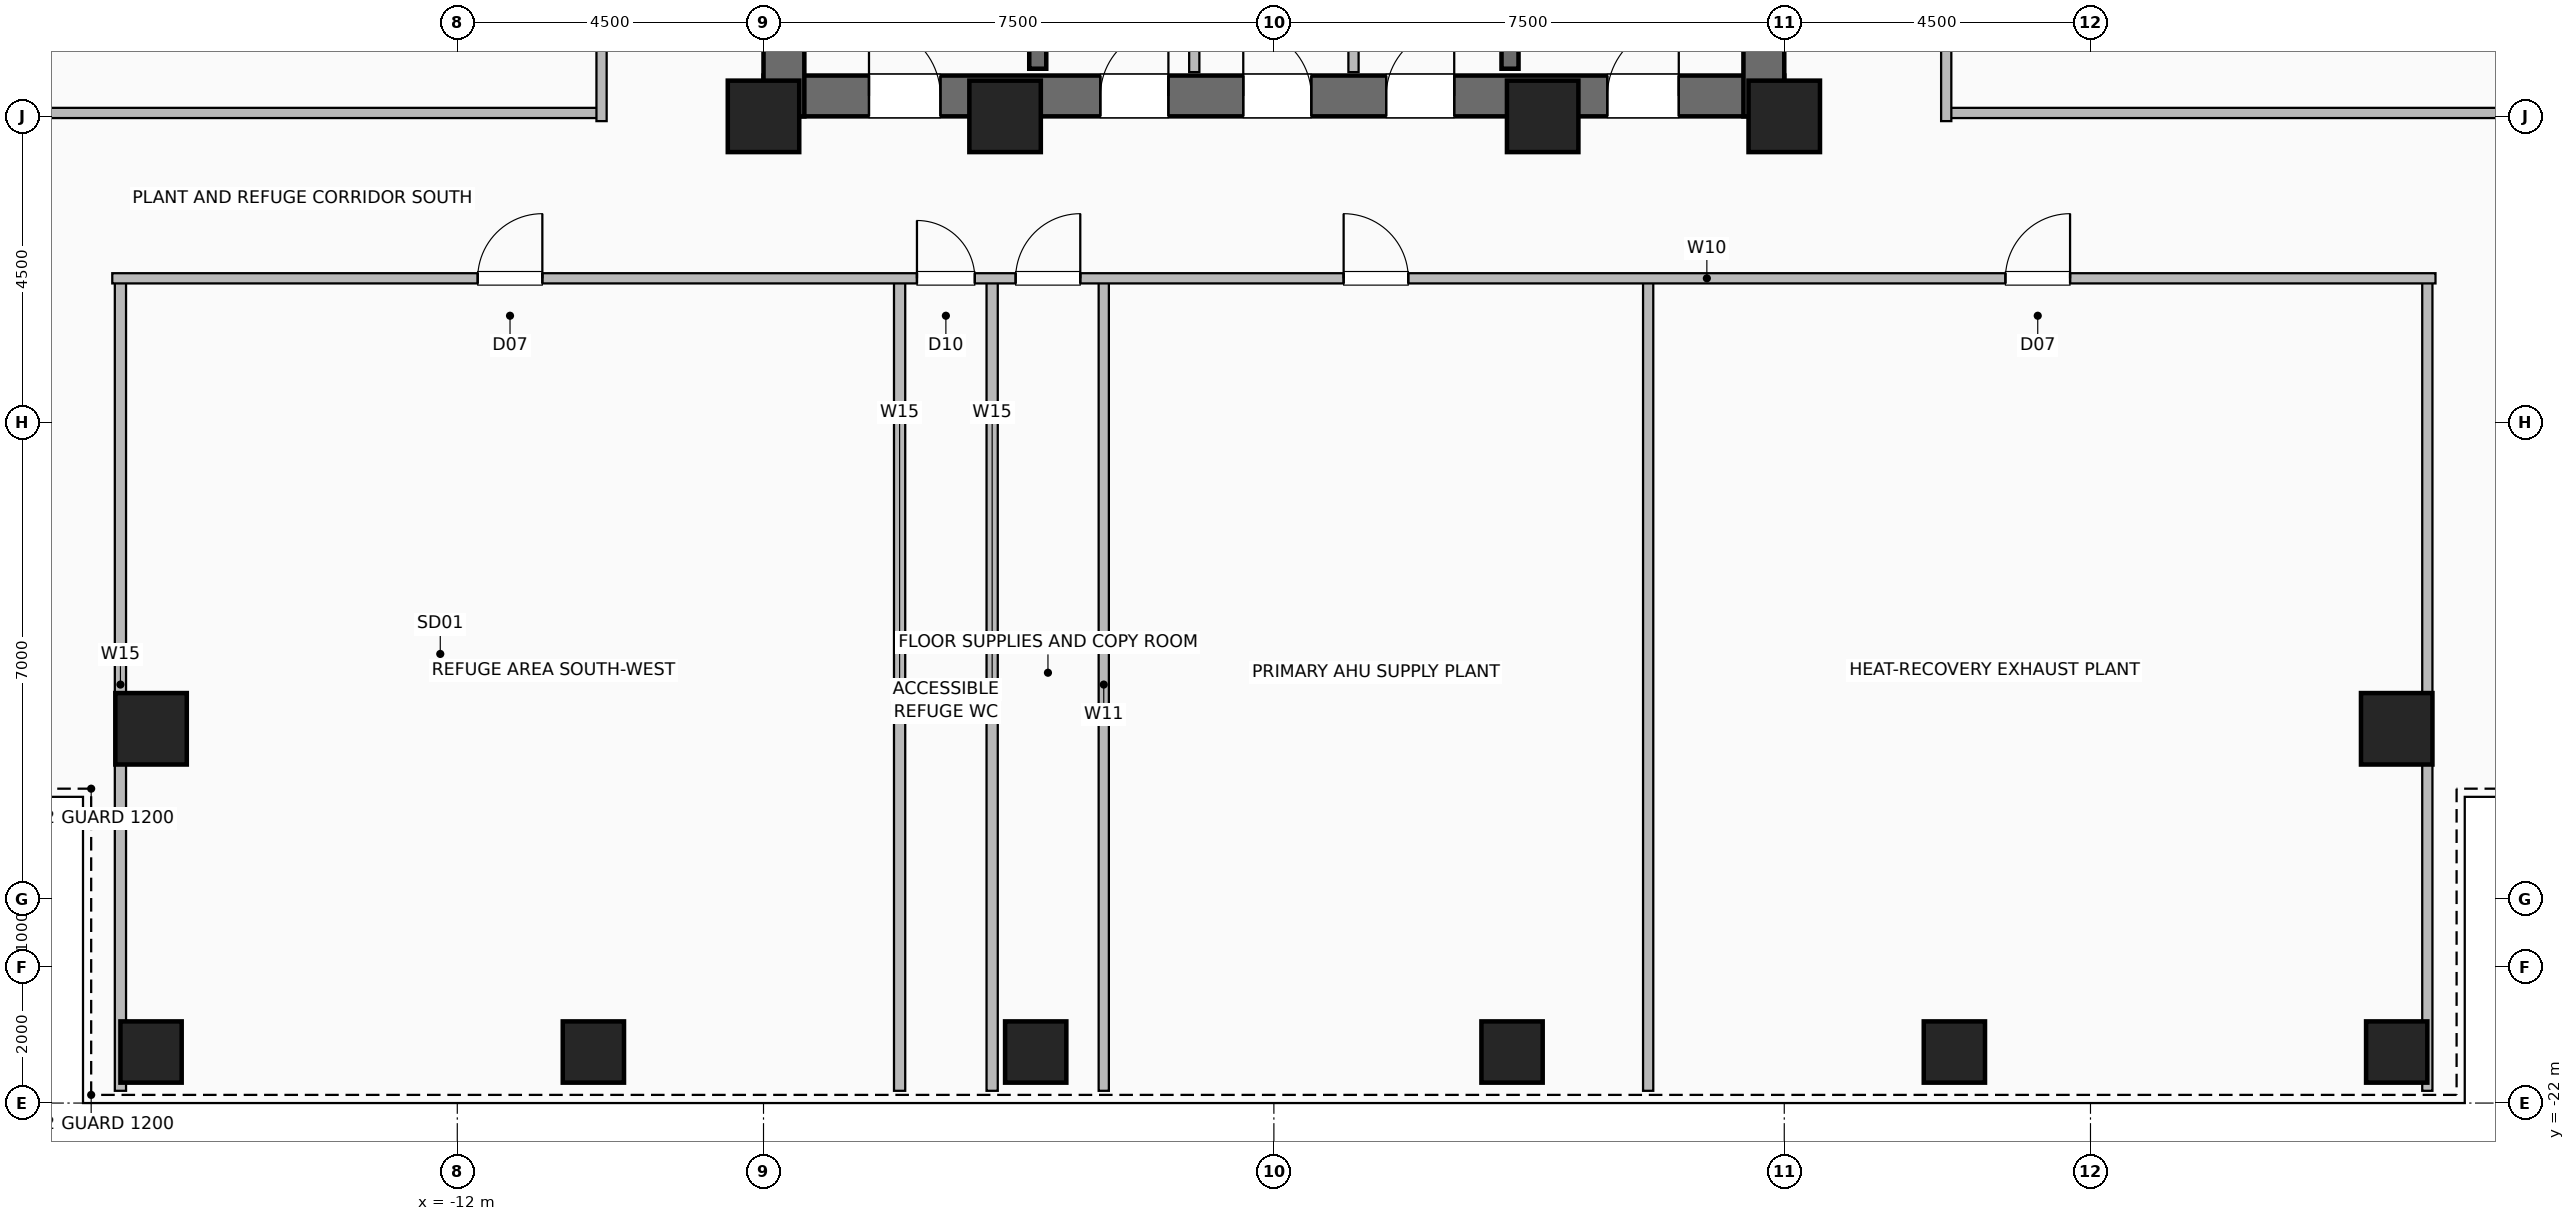
"""IFC4 building model, lengths in metres.
Left out: names, types, materials, properties, quantities, classifications, styles, units other than length and angle.
Written with IfcOpenShell. Run it as: python <this file> out.ifc"""

import sys

from ifc_helpers import new_model, si_unit, direction, frame, frame_2d, origin, origin_2d, place, context, subcontext, project, spatial, rectangle, hollow_rectangle, extrude, element, fill, save


model = new_model("IFC4")
c1 = context("Model", 3, precision=1e-05, world=origin(), true_north=direction((0.0, 1.0)))
c2 = subcontext(c1, "Body", "Model", "MODEL_VIEW")
j1 = project(units=[si_unit("LENGTHUNIT", "METRE"), si_unit("PLANEANGLEUNIT", "RADIAN")], contexts=[c1])
p1 = place(None, origin())
s1 = spatial("IfcSite", under=j1, at=p1, CompositionType="ELEMENT")
p2 = place(p1, origin())
s2 = spatial("IfcBuilding", under=s1, at=p2, CompositionType="ELEMENT")
p3 = place(p2, frame((0.0, 0.0, 160.2)))
s3 = spatial("IfcBuildingStorey", under=s2, at=p3, CompositionType="ELEMENT", Elevation=160.2)
for number, where, z_axis, x_axis in (
    (1, (-7.5, -7.5, 0.0), (0.0, 0.0, 1.0), (1.0, 0.0, 0.0)),
    (2, (-3.95, -7.5, 0.0), (0.0, 0.0, 1.0), (1.0, 0.0, 0.0)),
    (3, (3.95, -7.5, 0.0), (0.0, 0.0, 1.0), (1.0, 0.0, 0.0)),
    (4, (7.5, -7.5, 0.0), (0.0, 0.0, 1.0), (1.0, 0.0, 0.0)),
):
    element("IfcColumn", number, at=place(p3, frame(where, z_axis=z_axis, x_axis=x_axis)), inside=s3, PredefinedType="COLUMN", context=c2, shape_type="SweptSolid", body=[
        extrude(hollow_rectangle(XDim=1.05, YDim=1.05, WallThickness=0.05, at=origin_2d()), origin(), (0.0, 0.0, 1.0), 6.0),
    ])
for number, where, z_axis, x_axis in (
    (5, (-16.5, -21.25, 0.0), (0.0, 0.0, 1.0), (1.0, 0.0, 0.0)),
    (6, (-10.0, -21.25, 0.0), (0.0, 0.0, 1.0), (1.0, 0.0, 0.0)),
    (7, (-3.5, -21.25, 0.0), (0.0, 0.0, 1.0), (1.0, 0.0, 0.0)),
    (8, (3.5, -21.25, 0.0), (0.0, 0.0, 1.0), (1.0, 0.0, 0.0)),
    (9, (10.0, -21.25, 0.0), (0.0, 0.0, 1.0), (1.0, 0.0, 0.0)),
    (10, (16.5, -21.25, 0.0), (0.0, 0.0, 1.0), (1.0, 0.0, 0.0)),
):
    element("IfcColumn", number, at=place(p3, frame(where, z_axis=z_axis, x_axis=x_axis)), inside=s3, PredefinedType="COLUMN", context=c2, shape_type="SweptSolid", body=[
        extrude(hollow_rectangle(XDim=0.9, YDim=0.9, WallThickness=0.045, at=origin_2d()), origin(), (0.0, 0.0, 1.0), 5.6),
    ])
for number, where, z_axis, x_axis in (
    (11, (-16.5, -16.5, 0.0), (0.0, 0.0, 1.0), (1.0, 0.0, 0.0)),
    (12, (16.5, -16.5, 0.0), (0.0, 0.0, 1.0), (1.0, 0.0, 0.0)),
):
    element("IfcColumn", number, at=place(p3, frame(where, z_axis=z_axis, x_axis=x_axis)), inside=s3, PredefinedType="COLUMN", context=c2, shape_type="SweptSolid", body=[
        extrude(hollow_rectangle(XDim=1.05, YDim=1.05, WallThickness=0.05, at=origin_2d()), origin(), (0.0, 0.0, 1.0), 5.6),
    ])
p4 = place(p3, frame((-7.5, -7.2, 0.0), z_axis=(0.0, 0.0, 1.0), x_axis=(1.0, 0.0, 0.0)))
e13 = element("IfcWall", 13, at=p4, inside=s3, PredefinedType="SHEAR", context=c2, shape_type="SweptSolid", body=[
    extrude(rectangle(XDim=15.0, YDim=0.6, at=frame_2d((7.5, 0.0))), origin(), (0.0, 0.0, 1.0), 5.6),
])
p5 = place(p4, frame((1.55, 0.0, 0.0)))
e14 = element("IfcOpeningElement", 14, at=p5, cuts=e13, PredefinedType="OPENING", context=c2, shape_type="SweptSolid", body=[
    extrude(rectangle(XDim=1.05, YDim=2.08, at=frame_2d((0.525, 1.04))), frame((0.0, 0.31, 0.0), z_axis=(0.0, -1.0, 0.0), x_axis=(1.0, 0.0, 0.0)), (0.0, 0.0, 1.0), 0.62),
])
p6 = place(p4, frame((12.4, 0.0, 0.0)))
e15 = element("IfcOpeningElement", 15, at=p6, cuts=e13, PredefinedType="OPENING", context=c2, shape_type="SweptSolid", body=[
    extrude(rectangle(XDim=1.05, YDim=2.08, at=frame_2d((0.525, 1.04))), frame((0.0, 0.31, 0.0), z_axis=(0.0, -1.0, 0.0), x_axis=(1.0, 0.0, 0.0)), (0.0, 0.0, 1.0), 0.62),
])
p7 = place(p4, frame((4.95, 0.0, 0.0)))
e16 = element("IfcOpeningElement", 16, at=p7, cuts=e13, PredefinedType="OPENING", context=c2, shape_type="SweptSolid", body=[
    extrude(rectangle(XDim=1.0, YDim=2.08, at=frame_2d((0.5, 1.04))), frame((0.0, 0.31, 0.0), z_axis=(0.0, -1.0, 0.0), x_axis=(1.0, 0.0, 0.0)), (0.0, 0.0, 1.0), 0.62),
])
p8 = place(p4, frame((7.05, 0.0, 0.0)))
e17 = element("IfcOpeningElement", 17, at=p8, cuts=e13, PredefinedType="OPENING", context=c2, shape_type="SweptSolid", body=[
    extrude(rectangle(XDim=1.0, YDim=2.08, at=frame_2d((0.5, 1.04))), frame((0.0, 0.31, 0.0), z_axis=(0.0, -1.0, 0.0), x_axis=(1.0, 0.0, 0.0)), (0.0, 0.0, 1.0), 0.62),
])
p9 = place(p4, frame((9.15, 0.0, 0.0)))
e18 = element("IfcOpeningElement", 18, at=p9, cuts=e13, PredefinedType="OPENING", context=c2, shape_type="SweptSolid", body=[
    extrude(rectangle(XDim=1.0, YDim=2.08, at=frame_2d((0.5, 1.04))), frame((0.0, 0.31, 0.0), z_axis=(0.0, -1.0, 0.0), x_axis=(1.0, 0.0, 0.0)), (0.0, 0.0, 1.0), 0.62),
])
p10 = place(p3, frame((-7.2, -7.5, 0.0), z_axis=(0.0, 0.0, 1.0), x_axis=(0.0, 1.0, 0.0)))
e19 = element("IfcWall", 19, at=p10, inside=s3, PredefinedType="SHEAR", context=c2, shape_type="SweptSolid", body=[
    extrude(rectangle(XDim=15.0, YDim=0.6, at=frame_2d((7.5, 0.0))), origin(), (0.0, 0.0, 1.0), 5.6),
])
p11 = place(p10, frame((9.5, 0.0, 0.0)))
e20 = element("IfcOpeningElement", 20, at=p11, cuts=e19, PredefinedType="OPENING", context=c2, shape_type="SweptSolid", body=[
    extrude(rectangle(XDim=1.0, YDim=2.08, at=frame_2d((0.5, 1.04))), frame((0.0, 0.31, 0.0), z_axis=(0.0, -1.0, 0.0), x_axis=(1.0, 0.0, 0.0)), (0.0, 0.0, 1.0), 0.62),
])
p12 = place(p3, frame((7.2, -7.5, 0.0), z_axis=(0.0, 0.0, 1.0), x_axis=(0.0, 1.0, 0.0)))
e21 = element("IfcWall", 21, at=p12, inside=s3, PredefinedType="SHEAR", context=c2, shape_type="SweptSolid", body=[
    extrude(rectangle(XDim=15.0, YDim=0.6, at=frame_2d((7.5, 0.0))), origin(), (0.0, 0.0, 1.0), 5.6),
])
for number, where, z_axis, x_axis in (
    (22, (-3.47, -6.8, 0.0), (0.0, 0.0, 1.0), (0.0, 1.0, 0.0)),
    (23, (3.47, -6.8, 0.0), (0.0, 0.0, 1.0), (0.0, 1.0, 0.0)),
):
    element("IfcWall", number, at=place(p3, frame(where, z_axis=z_axis, x_axis=x_axis)), inside=s3, PredefinedType="SHEAR", context=c2, shape_type="SweptSolid", body=[
        extrude(rectangle(XDim=7.72, YDim=0.25, at=frame_2d((3.86, 0.0))), origin(), (0.0, 0.0, 1.0), 5.6),
    ])
for number, where, z_axis, x_axis in (
    (24, (-1.17, -6.85, 0.0), (0.0, 0.0, 1.0), (0.0, 1.0, 0.0)),
    (25, (1.17, -6.85, 0.0), (0.0, 0.0, 1.0), (0.0, 1.0, 0.0)),
):
    element("IfcWall", number, at=place(p3, frame(where, z_axis=z_axis, x_axis=x_axis)), inside=s3, PredefinedType="PARTITIONING", context=c2, shape_type="SweptSolid", body=[
        extrude(rectangle(XDim=4.42, YDim=0.15, at=frame_2d((2.21, 0.0))), origin(), (0.0, 0.0, 1.0), 5.6),
    ])
for number, where, z_axis, x_axis in (
    (26, (-4.14, -21.82, 0.0), (0.0, 0.0, 1.0), (0.0, 1.0, 0.0)),
    (27, (-16.95, -21.82, 0.0), (0.0, 0.0, 1.0), (0.0, 1.0, 0.0)),
    (28, (-5.5, -21.82, 0.0), (0.0, 0.0, 1.0), (0.0, 1.0, 0.0)),
):
    element("IfcWall", number, at=place(p3, frame(where, z_axis=z_axis, x_axis=x_axis)), inside=s3, PredefinedType="PLUMBINGWALL", context=c2, shape_type="SweptSolid", body=[
        extrude(rectangle(XDim=11.94, YDim=0.165, at=frame_2d((5.97, 0.0))), origin(), (0.0, 0.0, 1.0), 5.6),
    ])
for number, where, z_axis, x_axis in (
    (29, (-2.5, -21.82, 0.0), (0.0, 0.0, 1.0), (0.0, 1.0, 0.0)),
    (30, (5.5, -21.82, 0.0), (0.0, 0.0, 1.0), (0.0, 1.0, 0.0)),
    (31, (16.95, -21.82, 0.0), (0.0, 0.0, 1.0), (0.0, 1.0, 0.0)),
):
    element("IfcWall", number, at=place(p3, frame(where, z_axis=z_axis, x_axis=x_axis)), inside=s3, PredefinedType="PARTITIONING", context=c2, shape_type="SweptSolid", body=[
        extrude(rectangle(XDim=11.94, YDim=0.15, at=frame_2d((5.97, 0.0))), origin(), (0.0, 0.0, 1.0), 5.6),
    ])
p13 = place(p3, frame((-17.07, -9.88, 0.0), z_axis=(0.0, 0.0, 1.0), x_axis=(1.0, 0.0, 0.0)))
e32 = element("IfcWall", 32, at=p13, inside=s3, PredefinedType="PARTITIONING", context=c2, shape_type="SweptSolid", body=[
    extrude(rectangle(XDim=34.14, YDim=0.15, at=frame_2d((17.07, 0.0))), origin(), (0.0, 0.0, 1.0), 5.6),
])
p14 = place(p13, frame((5.37, 0.0, 0.0)))
e33 = element("IfcOpeningElement", 33, at=p14, cuts=e32, PredefinedType="OPENING", context=c2, shape_type="SweptSolid", body=[
    extrude(rectangle(XDim=0.95, YDim=2.06, at=frame_2d((0.475, 1.03))), frame((0.0, 0.085, 0.0), z_axis=(0.0, -1.0, 0.0), x_axis=(1.0, 0.0, 0.0)), (0.0, 0.0, 1.0), 0.17),
])
p15 = place(p13, frame((11.825, 0.0, 0.0)))
e34 = element("IfcOpeningElement", 34, at=p15, cuts=e32, PredefinedType="OPENING", context=c2, shape_type="SweptSolid", body=[
    extrude(rectangle(XDim=0.85, YDim=2.05, at=frame_2d((0.425, 1.025))), frame((0.0, 0.085, 0.0), z_axis=(0.0, -1.0, 0.0), x_axis=(1.0, 0.0, 0.0)), (0.0, 0.0, 1.0), 0.17),
])
p16 = place(p13, frame((13.275, 0.0, 0.0)))
e35 = element("IfcOpeningElement", 35, at=p16, cuts=e32, PredefinedType="OPENING", context=c2, shape_type="SweptSolid", body=[
    extrude(rectangle(XDim=0.95, YDim=2.06, at=frame_2d((0.475, 1.03))), frame((0.0, 0.085, 0.0), z_axis=(0.0, -1.0, 0.0), x_axis=(1.0, 0.0, 0.0)), (0.0, 0.0, 1.0), 0.17),
])
p17 = place(p13, frame((18.095, 0.0, 0.0)))
e36 = element("IfcOpeningElement", 36, at=p17, cuts=e32, PredefinedType="OPENING", context=c2, shape_type="SweptSolid", body=[
    extrude(rectangle(XDim=0.95, YDim=2.06, at=frame_2d((0.475, 1.03))), frame((0.0, 0.085, 0.0), z_axis=(0.0, -1.0, 0.0), x_axis=(1.0, 0.0, 0.0)), (0.0, 0.0, 1.0), 0.17),
])
p18 = place(p13, frame((27.82, 0.0, 0.0)))
e37 = element("IfcOpeningElement", 37, at=p18, cuts=e32, PredefinedType="OPENING", context=c2, shape_type="SweptSolid", body=[
    extrude(rectangle(XDim=0.95, YDim=2.06, at=frame_2d((0.475, 1.03))), frame((0.0, 0.085, 0.0), z_axis=(0.0, -1.0, 0.0), x_axis=(1.0, 0.0, 0.0)), (0.0, 0.0, 1.0), 0.17),
])
p19 = place(p3, frame((-21.82, -7.45, 0.0), z_axis=(0.0, 0.0, 1.0), x_axis=(1.0, 0.0, 0.0)))
e38 = element("IfcWall", 38, at=p19, inside=s3, PredefinedType="PARTITIONING", context=c2, shape_type="SweptSolid", body=[
    extrude(rectangle(XDim=11.94, YDim=0.15, at=frame_2d((5.97, 0.0))), origin(), (0.0, 0.0, 1.0), 3.975),
])
p20 = place(p3, frame((-9.88, -7.57, 0.0), z_axis=(0.0, 0.0, 1.0), x_axis=(0.0, 1.0, 0.0)))
e39 = element("IfcWall", 39, at=p20, inside=s3, PredefinedType="PARTITIONING", context=c2, shape_type="SweptSolid", body=[
    extrude(rectangle(XDim=15.14, YDim=0.15, at=frame_2d((7.57, 0.0))), origin(), (0.0, 0.0, 1.0), 5.6),
])
p21 = place(p20, frame((4.17, 0.0, 0.0)))
e40 = element("IfcOpeningElement", 40, at=p21, cuts=e39, PredefinedType="OPENING", context=c2, shape_type="SweptSolid", body=[
    extrude(rectangle(XDim=0.95, YDim=2.06, at=frame_2d((0.475, 1.03))), frame((0.0, 0.085, 0.0), z_axis=(0.0, -1.0, 0.0), x_axis=(1.0, 0.0, 0.0)), (0.0, 0.0, 1.0), 0.17),
])
p22 = place(p20, frame((11.62, 0.0, 0.0)))
e41 = element("IfcOpeningElement", 41, at=p22, cuts=e39, PredefinedType="OPENING", context=c2, shape_type="SweptSolid", body=[
    extrude(rectangle(XDim=0.95, YDim=2.06, at=frame_2d((0.475, 1.03))), frame((0.0, 0.085, 0.0), z_axis=(0.0, -1.0, 0.0), x_axis=(1.0, 0.0, 0.0)), (0.0, 0.0, 1.0), 0.17),
])
p23 = place(p3, frame((9.88, -7.45, 0.0), z_axis=(0.0, 0.0, 1.0), x_axis=(1.0, 0.0, 0.0)))
e42 = element("IfcWall", 42, at=p23, inside=s3, PredefinedType="PARTITIONING", context=c2, shape_type="SweptSolid", body=[
    extrude(rectangle(XDim=11.94, YDim=0.15, at=frame_2d((5.97, 0.0))), origin(), (0.0, 0.0, 1.0), 3.975),
])
p24 = place(p3, frame((9.88, -7.57, 0.0), z_axis=(0.0, 0.0, 1.0), x_axis=(0.0, 1.0, 0.0)))
e43 = element("IfcWall", 43, at=p24, inside=s3, PredefinedType="PARTITIONING", context=c2, shape_type="SweptSolid", body=[
    extrude(rectangle(XDim=15.14, YDim=0.15, at=frame_2d((7.57, 0.0))), origin(), (0.0, 0.0, 1.0), 5.6),
])
p25 = place(p24, frame((4.17, 0.0, 0.0)))
e44 = element("IfcOpeningElement", 44, at=p25, cuts=e43, PredefinedType="OPENING", context=c2, shape_type="SweptSolid", body=[
    extrude(rectangle(XDim=0.95, YDim=2.06, at=frame_2d((0.475, 1.03))), frame((0.0, 0.085, 0.0), z_axis=(0.0, -1.0, 0.0), x_axis=(1.0, 0.0, 0.0)), (0.0, 0.0, 1.0), 0.17),
])
p26 = place(p24, frame((11.62, 0.0, 0.0)))
e45 = element("IfcOpeningElement", 45, at=p26, cuts=e43, PredefinedType="OPENING", context=c2, shape_type="SweptSolid", body=[
    extrude(rectangle(XDim=0.95, YDim=2.06, at=frame_2d((0.475, 1.03))), frame((0.0, 0.085, 0.0), z_axis=(0.0, -1.0, 0.0), x_axis=(1.0, 0.0, 0.0)), (0.0, 0.0, 1.0), 0.17),
])
p27 = place(p5, origin())
e46 = element("IfcDoor", 46, at=p27, inside=s3, OperationType="SINGLE_SWING_LEFT", PredefinedType="DOOR", context=c2, shape_type="SweptSolid", body=[
    extrude(rectangle(XDim=1.05, YDim=2.08, at=frame_2d((0.525, 1.04))), frame((0.0, 0.025, 0.0), z_axis=(0.0, -1.0, 0.0), x_axis=(1.0, 0.0, 0.0)), (0.0, 0.0, 1.0), 0.05),
])
fill(e14, e46)
p28 = place(p6, origin())
e47 = element("IfcDoor", 47, at=p28, inside=s3, OperationType="SINGLE_SWING_RIGHT", PredefinedType="DOOR", context=c2, shape_type="SweptSolid", body=[
    extrude(rectangle(XDim=1.05, YDim=2.08, at=frame_2d((0.525, 1.04))), frame((0.0, 0.025, 0.0), z_axis=(0.0, -1.0, 0.0), x_axis=(1.0, 0.0, 0.0)), (0.0, 0.0, 1.0), 0.05),
])
fill(e15, e47)
p29 = place(p7, origin())
e48 = element("IfcDoor", 48, at=p29, inside=s3, OperationType="SINGLE_SWING_RIGHT", PredefinedType="DOOR", context=c2, shape_type="SweptSolid", body=[
    extrude(rectangle(XDim=1.0, YDim=2.08, at=frame_2d((0.5, 1.04))), frame((0.0, 0.025, 0.0), z_axis=(0.0, -1.0, 0.0), x_axis=(1.0, 0.0, 0.0)), (0.0, 0.0, 1.0), 0.05),
])
fill(e16, e48)
p30 = place(p8, origin())
e49 = element("IfcDoor", 49, at=p30, inside=s3, OperationType="SINGLE_SWING_LEFT", PredefinedType="DOOR", context=c2, shape_type="SweptSolid", body=[
    extrude(rectangle(XDim=1.0, YDim=2.08, at=frame_2d((0.5, 1.04))), frame((0.0, 0.025, 0.0), z_axis=(0.0, -1.0, 0.0), x_axis=(1.0, 0.0, 0.0)), (0.0, 0.0, 1.0), 0.05),
])
fill(e17, e49)
p31 = place(p9, origin())
e50 = element("IfcDoor", 50, at=p31, inside=s3, OperationType="SINGLE_SWING_RIGHT", PredefinedType="DOOR", context=c2, shape_type="SweptSolid", body=[
    extrude(rectangle(XDim=1.0, YDim=2.08, at=frame_2d((0.5, 1.04))), frame((0.0, 0.025, 0.0), z_axis=(0.0, -1.0, 0.0), x_axis=(1.0, 0.0, 0.0)), (0.0, 0.0, 1.0), 0.05),
])
fill(e18, e50)
p32 = place(p14, origin())
e51 = element("IfcDoor", 51, at=p32, inside=s3, OperationType="SINGLE_SWING_RIGHT", PredefinedType="DOOR", context=c2, shape_type="SweptSolid", body=[
    extrude(rectangle(XDim=0.95, YDim=2.06, at=frame_2d((0.475, 1.03))), frame((0.0, 0.025, 0.0), z_axis=(0.0, -1.0, 0.0), x_axis=(1.0, 0.0, 0.0)), (0.0, 0.0, 1.0), 0.05),
])
fill(e33, e51)
p33 = place(p15, origin())
e52 = element("IfcDoor", 52, at=p33, inside=s3, OperationType="SINGLE_SWING_LEFT", PredefinedType="DOOR", context=c2, shape_type="SweptSolid", body=[
    extrude(rectangle(XDim=0.85, YDim=2.05, at=frame_2d((0.425, 1.025))), frame((0.0, 0.025, 0.0), z_axis=(0.0, -1.0, 0.0), x_axis=(1.0, 0.0, 0.0)), (0.0, 0.0, 1.0), 0.05),
])
fill(e34, e52)
p34 = place(p16, origin())
e53 = element("IfcDoor", 53, at=p34, inside=s3, OperationType="SINGLE_SWING_RIGHT", PredefinedType="DOOR", context=c2, shape_type="SweptSolid", body=[
    extrude(rectangle(XDim=0.95, YDim=2.06, at=frame_2d((0.475, 1.03))), frame((0.0, 0.025, 0.0), z_axis=(0.0, -1.0, 0.0), x_axis=(1.0, 0.0, 0.0)), (0.0, 0.0, 1.0), 0.05),
])
fill(e35, e53)
p35 = place(p17, origin())
e54 = element("IfcDoor", 54, at=p35, inside=s3, OperationType="SINGLE_SWING_LEFT", PredefinedType="DOOR", context=c2, shape_type="SweptSolid", body=[
    extrude(rectangle(XDim=0.95, YDim=2.06, at=frame_2d((0.475, 1.03))), frame((0.0, 0.025, 0.0), z_axis=(0.0, -1.0, 0.0), x_axis=(1.0, 0.0, 0.0)), (0.0, 0.0, 1.0), 0.05),
])
fill(e36, e54)
p36 = place(p18, origin())
e55 = element("IfcDoor", 55, at=p36, inside=s3, OperationType="SINGLE_SWING_RIGHT", PredefinedType="DOOR", context=c2, shape_type="SweptSolid", body=[
    extrude(rectangle(XDim=0.95, YDim=2.06, at=frame_2d((0.475, 1.03))), frame((0.0, 0.025, 0.0), z_axis=(0.0, -1.0, 0.0), x_axis=(1.0, 0.0, 0.0)), (0.0, 0.0, 1.0), 0.05),
])
fill(e37, e55)
save(model, sys.argv[1])
